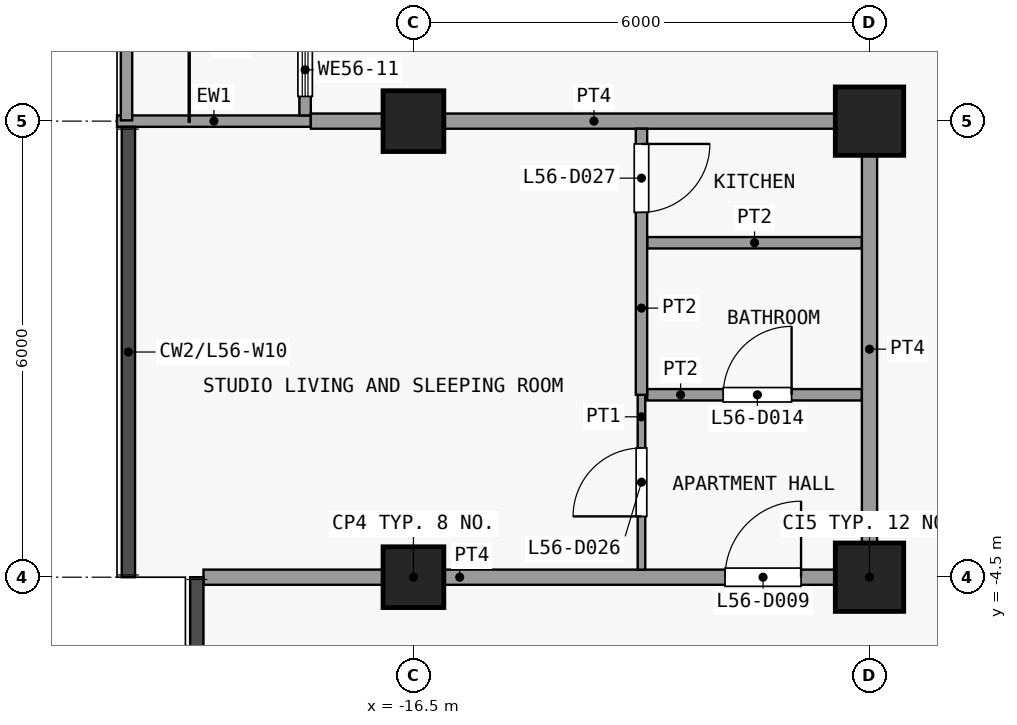
"""IFC4 building model, lengths in metres.
Left out: names, types, materials, properties, quantities, classifications, styles, units other than length and angle.
Written with IfcOpenShell. Run it as: python <this file> out.ifc"""

import sys

from ifc_helpers import new_model, si_unit, direction, frame, frame_2d, origin, origin_2d, place, context, subcontext, project, spatial, rectangle, extrude, element, fill, save


model = new_model("IFC4")
c1 = context("Model", 3, precision=1e-05, world=origin(), true_north=direction((0.0, 1.0)))
c2 = subcontext(c1, "Body", "Model", "MODEL_VIEW")
j1 = project(units=[si_unit("LENGTHUNIT", "METRE"), si_unit("PLANEANGLEUNIT", "RADIAN")], contexts=[c1])
p1 = place(None, origin())
s1 = spatial("IfcSite", under=j1, at=p1, CompositionType="ELEMENT")
p2 = place(p1, origin())
s2 = spatial("IfcBuilding", under=s1, at=p2, CompositionType="ELEMENT")
p3 = place(p2, frame((0.0, 0.0, 223.1)))
s3 = spatial("IfcBuildingStorey", under=s2, at=p3, CompositionType="ELEMENT", Elevation=223.1)
for number, where, z_axis, x_axis in (
    (1, (-16.5, -4.5, 0.0), (0.0, 0.0, 1.0), (1.0, 0.0, 0.0)),
    (2, (-16.5, 1.5, 0.0), (0.0, 0.0, 1.0), (1.0, 0.0, 0.0)),
):
    element("IfcColumn", number, at=place(p3, frame(where, z_axis=z_axis, x_axis=x_axis)), inside=s3, PredefinedType="COLUMN", context=c2, shape_type="SweptSolid", body=[
        extrude(rectangle(XDim=0.8, YDim=0.8, at=origin_2d()), origin(), (0.0, 0.0, 1.0), 3.6),
    ])
for number, where, z_axis, x_axis in (
    (3, (-10.5, -4.5, 0.0), (0.0, 0.0, 1.0), (1.0, 0.0, 0.0)),
    (4, (-10.5, 1.5, 0.0), (0.0, 0.0, 1.0), (1.0, 0.0, 0.0)),
):
    element("IfcColumn", number, at=place(p3, frame(where, z_axis=z_axis, x_axis=x_axis)), inside=s3, PredefinedType="COLUMN", context=c2, shape_type="SweptSolid", body=[
        extrude(rectangle(XDim=0.9, YDim=0.9, at=origin_2d()), origin(), (0.0, 0.0, 1.0), 3.6),
    ])
p4 = place(p3, frame((-17.85, 1.5, 0.0), z_axis=(0.0, 0.0, 1.0), x_axis=(-1.0, 0.0, 0.0)))
e5 = element("IfcWall", 5, at=p4, inside=s3, PredefinedType="SOLIDWALL", context=c2, shape_type="SweptSolid", body=[
    extrude(rectangle(XDim=2.55, YDim=0.15, at=frame_2d((1.275, 0.0))), origin(), (0.0, 0.0, 1.0), 3.3),
])
p5 = place(p3, frame((-17.925, 1.575, 0.0), z_axis=(0.0, 0.0, 1.0), x_axis=(0.0, 1.0, 0.0)))
e6 = element("IfcWall", 6, at=p5, inside=s3, PredefinedType="SOLIDWALL", context=c2, shape_type="SweptSolid", body=[
    extrude(rectangle(XDim=5.85, YDim=0.15, at=frame_2d((2.925, 0.0))), origin(), (0.0, 0.0, 1.0), 3.3),
])
p6 = place(p5, frame((1.2, 0.0, 0.0)))
e7 = element("IfcOpeningElement", 7, at=p6, cuts=e6, PredefinedType="OPENING", context=c2, shape_type="SweptSolid", body=[
    extrude(rectangle(XDim=1.2, YDim=2.4, at=frame_2d((0.6, 1.2))), frame((0.0, 0.085, 0.0), z_axis=(0.0, -1.0, 0.0), x_axis=(1.0, 0.0, 0.0)), (0.0, 0.0, 1.0), 0.17),
])
p7 = place(p5, frame((0.25, 0.0, 0.9)))
e8 = element("IfcOpeningElement", 8, at=p7, cuts=e6, PredefinedType="OPENING", context=c2, shape_type="SweptSolid", body=[
    extrude(rectangle(XDim=0.7, YDim=2.1, at=frame_2d((0.35, 1.05))), frame((0.0, 0.085, 0.0), z_axis=(0.0, -1.0, 0.0), x_axis=(1.0, 0.0, 0.0)), (0.0, 0.0, 1.0), 0.17),
])
p8 = place(p5, frame((3.225, 0.0, 0.9)))
e9 = element("IfcOpeningElement", 9, at=p8, cuts=e6, PredefinedType="OPENING", context=c2, shape_type="SweptSolid", body=[
    extrude(rectangle(XDim=1.8, YDim=2.1, at=frame_2d((0.9, 1.05))), frame((0.0, 0.085, 0.0), z_axis=(0.0, -1.0, 0.0), x_axis=(1.0, 0.0, 0.0)), (0.0, 0.0, 1.0), 0.17),
])
p9 = place(p3, frame((-20.275, 1.51, 0.0), z_axis=(0.0, 0.0, 1.0), x_axis=(0.0, 1.0, 0.0)))
e10 = element("IfcWall", 10, at=p9, inside=s3, PredefinedType="PARAPET", context=c2, shape_type="SweptSolid", body=[
    extrude(rectangle(XDim=5.94, YDim=0.15, at=frame_2d((2.97, 0.0))), origin(), (0.0, 0.0, 1.0), 1.15),
])
p10 = place(p3, frame((-19.262, -4.5, 0.0), z_axis=(0.0, 0.0, 1.0), x_axis=(1.0, 0.0, 0.0)))
e11 = element("IfcWall", 11, at=p10, inside=s3, PredefinedType="PARTITIONING", context=c2, shape_type="SweptSolid", body=[
    extrude(rectangle(XDim=8.863, YDim=0.2, at=frame_2d((4.431, 0.0))), origin(), (0.0, 0.0, 1.0), 3.3),
])
p11 = place(p10, frame((6.862, 0.0, 0.0)))
e12 = element("IfcOpeningElement", 12, at=p11, cuts=e11, PredefinedType="OPENING", context=c2, shape_type="SweptSolid", body=[
    extrude(rectangle(XDim=1.0, YDim=2.1, at=frame_2d((0.5, 1.05))), frame((0.0, 0.11, 0.0), z_axis=(0.0, -1.0, 0.0), x_axis=(1.0, 0.0, 0.0)), (0.0, 0.0, 1.0), 0.22),
])
p12 = place(p3, frame((-13.425, -2.1, 0.0), z_axis=(0.0, 0.0, 1.0), x_axis=(1.0, 0.0, 0.0)))
e13 = element("IfcWall", 13, at=p12, inside=s3, PredefinedType="PARTITIONING", context=c2, shape_type="SweptSolid", body=[
    extrude(rectangle(XDim=2.825, YDim=0.15, at=frame_2d((1.413, 0.0))), origin(), (0.0, 0.0, 1.0), 3.3),
])
p13 = place(p12, frame((1.0, 0.0, 0.0)))
e14 = element("IfcOpeningElement", 14, at=p13, cuts=e13, PredefinedType="OPENING", context=c2, shape_type="SweptSolid", body=[
    extrude(rectangle(XDim=0.9, YDim=2.1, at=frame_2d((0.45, 1.05))), frame((0.0, 0.085, 0.0), z_axis=(0.0, -1.0, 0.0), x_axis=(1.0, 0.0, 0.0)), (0.0, 0.0, 1.0), 0.17),
])
p14 = place(p3, frame((-13.425, -0.1, 0.0), z_axis=(0.0, 0.0, 1.0), x_axis=(1.0, 0.0, 0.0)))
e15 = element("IfcWall", 15, at=p14, inside=s3, PredefinedType="PARTITIONING", context=c2, shape_type="SweptSolid", body=[
    extrude(rectangle(XDim=2.825, YDim=0.15, at=frame_2d((1.413, 0.0))), origin(), (0.0, 0.0, 1.0), 3.3),
])
p15 = place(p3, frame((-17.85, 1.5, 0.0), z_axis=(0.0, 0.0, 1.0), x_axis=(1.0, 0.0, 0.0)))
e16 = element("IfcWall", 16, at=p15, inside=s3, PredefinedType="PARTITIONING", context=c2, shape_type="SweptSolid", body=[
    extrude(rectangle(XDim=7.45, YDim=0.2, at=frame_2d((3.725, 0.0))), origin(), (0.0, 0.0, 1.0), 3.3),
])
p16 = place(p3, frame((-13.5, -4.4, 0.0), z_axis=(0.0, 0.0, 1.0), x_axis=(0.0, 1.0, 0.0)))
e17 = element("IfcWall", 17, at=p16, inside=s3, PredefinedType="PARTITIONING", context=c2, shape_type="SweptSolid", body=[
    extrude(rectangle(XDim=2.3, YDim=0.1, at=frame_2d((1.15, 0.0))), origin(), (0.0, 0.0, 1.0), 3.3),
])
p17 = place(p16, frame((0.7, 0.0, 0.0)))
e18 = element("IfcOpeningElement", 18, at=p17, cuts=e17, PredefinedType="OPENING", context=c2, shape_type="SweptSolid", body=[
    extrude(rectangle(XDim=0.9, YDim=2.1, at=frame_2d((0.45, 1.05))), frame((0.0, 0.06, 0.0), z_axis=(0.0, -1.0, 0.0), x_axis=(1.0, 0.0, 0.0)), (0.0, 0.0, 1.0), 0.12),
])
p18 = place(p3, frame((-13.5, -2.1, 0.0), z_axis=(0.0, 0.0, 1.0), x_axis=(0.0, 1.0, 0.0)))
e19 = element("IfcWall", 19, at=p18, inside=s3, PredefinedType="PARTITIONING", context=c2, shape_type="SweptSolid", body=[
    extrude(rectangle(XDim=3.5, YDim=0.15, at=frame_2d((1.75, 0.0))), origin(), (0.0, 0.0, 1.0), 3.3),
])
p19 = place(p18, frame((2.4, 0.0, 0.0)))
e20 = element("IfcOpeningElement", 20, at=p19, cuts=e19, PredefinedType="OPENING", context=c2, shape_type="SweptSolid", body=[
    extrude(rectangle(XDim=0.9, YDim=2.1, at=frame_2d((0.45, 1.05))), frame((0.0, 0.085, 0.0), z_axis=(0.0, -1.0, 0.0), x_axis=(1.0, 0.0, 0.0)), (0.0, 0.0, 1.0), 0.17),
])
p20 = place(p3, frame((-10.5, -4.4, 0.0), z_axis=(0.0, 0.0, 1.0), x_axis=(0.0, 1.0, 0.0)))
e21 = element("IfcWall", 21, at=p20, inside=s3, PredefinedType="PARTITIONING", context=c2, shape_type="SweptSolid", body=[
    extrude(rectangle(XDim=5.8, YDim=0.2, at=frame_2d((2.9, 0.0))), origin(), (0.0, 0.0, 1.0), 3.3),
])
p21 = place(p7, origin())
e22 = element("IfcWindow", 22, at=p21, inside=s3, PartitioningType="SINGLE_PANEL", PredefinedType="WINDOW", context=c2, shape_type="SweptSolid", body=[
    extrude(rectangle(XDim=0.7, YDim=2.1, at=frame_2d((0.35, 1.05))), frame((0.0, 0.03, 0.0), z_axis=(0.0, -1.0, 0.0), x_axis=(1.0, 0.0, 0.0)), (0.0, 0.0, 1.0), 0.06),
])
fill(e8, e22)
p22 = place(p11, origin())
e23 = element("IfcDoor", 23, at=p22, inside=s3, OperationType="SINGLE_SWING_LEFT", PredefinedType="DOOR", context=c2, shape_type="SweptSolid", body=[
    extrude(rectangle(XDim=1.0, YDim=2.1, at=frame_2d((0.5, 1.05))), frame((0.0, 0.025, 0.0), z_axis=(0.0, -1.0, 0.0), x_axis=(1.0, 0.0, 0.0)), (0.0, 0.0, 1.0), 0.05),
])
fill(e12, e23)
p23 = place(p13, origin())
e24 = element("IfcDoor", 24, at=p23, inside=s3, OperationType="SINGLE_SWING_LEFT", PredefinedType="DOOR", context=c2, shape_type="SweptSolid", body=[
    extrude(rectangle(XDim=0.9, YDim=2.1, at=frame_2d((0.45, 1.05))), frame((0.0, 0.025, 0.0), z_axis=(0.0, -1.0, 0.0), x_axis=(1.0, 0.0, 0.0)), (0.0, 0.0, 1.0), 0.05),
])
fill(e14, e24)
p24 = place(p17, origin())
e25 = element("IfcDoor", 25, at=p24, inside=s3, OperationType="SINGLE_SWING_RIGHT", PredefinedType="DOOR", context=c2, shape_type="SweptSolid", body=[
    extrude(rectangle(XDim=0.9, YDim=2.1, at=frame_2d((0.45, 1.05))), frame((0.0, 0.025, 0.0), z_axis=(0.0, -1.0, 0.0), x_axis=(1.0, 0.0, 0.0)), (0.0, 0.0, 1.0), 0.05),
])
fill(e18, e25)
p25 = place(p19, origin())
e26 = element("IfcDoor", 26, at=p25, inside=s3, OperationType="SINGLE_SWING_RIGHT", PredefinedType="DOOR", context=c2, shape_type="SweptSolid", body=[
    extrude(rectangle(XDim=0.9, YDim=2.1, at=frame_2d((0.45, 1.05))), frame((0.0, 0.025, 0.0), z_axis=(0.0, -1.0, 0.0), x_axis=(1.0, 0.0, 0.0)), (0.0, 0.0, 1.0), 0.05),
])
fill(e20, e26)
save(model, sys.argv[1])
